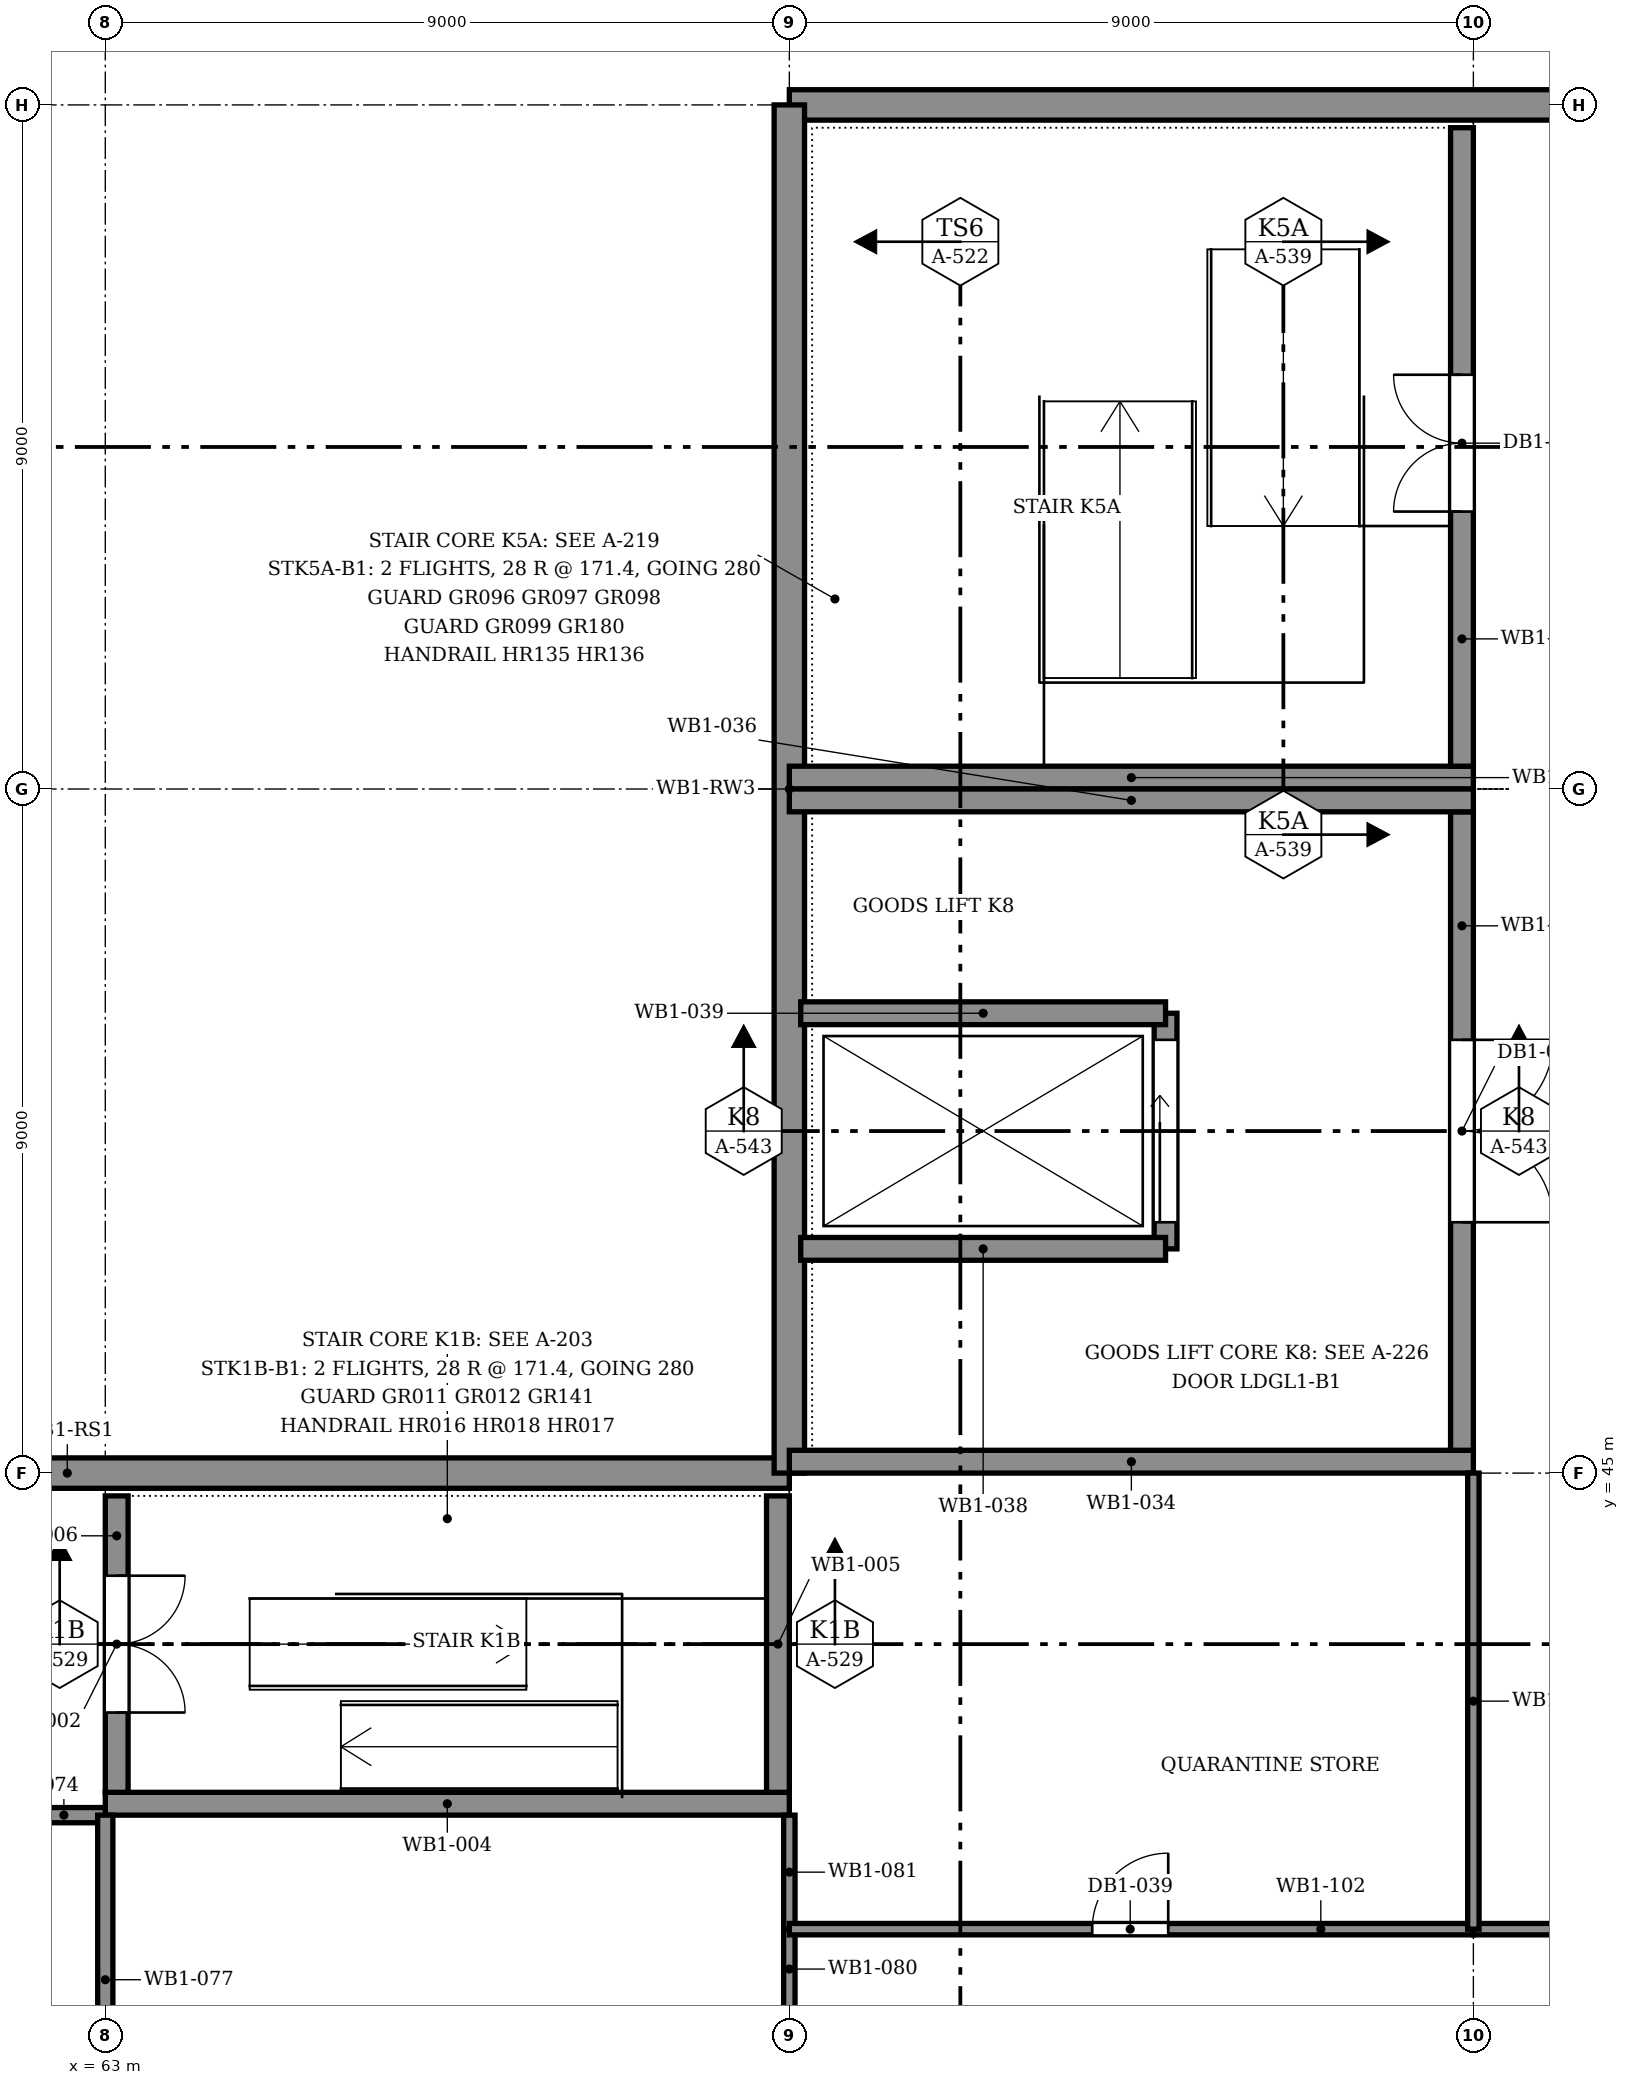
"""IFC4 building model, lengths in metres.
Left out: names, types, materials, properties, quantities, classifications, styles, units other than length and angle.
Written with IfcOpenShell. Run it as: python <this file> out.ifc"""

import sys

from ifc_helpers import new_model, si_unit, direction, frame, frame_2d, origin, place, context, subcontext, project, spatial, rectangle, extrude, element, fill, save


model = new_model("IFC4")
c1 = context("Model", 3, precision=1e-05, world=origin(), true_north=direction((0.0, 1.0)))
c2 = subcontext(c1, "Body", "Model", "MODEL_VIEW")
j1 = project(units=[si_unit("LENGTHUNIT", "METRE"), si_unit("PLANEANGLEUNIT", "RADIAN")], contexts=[c1])
p1 = place(None, origin())
s1 = spatial("IfcSite", under=j1, at=p1, CompositionType="ELEMENT")
p2 = place(p1, origin())
s2 = spatial("IfcBuilding", under=s1, at=p2, CompositionType="ELEMENT")
p3 = place(p2, frame((0.0, 0.0, -4.8)))
s3 = spatial("IfcBuildingStorey", under=s2, at=p3, CompositionType="ELEMENT", Elevation=-4.8)
p4 = place(p3, frame((0.0, 45.0, 0.0), z_axis=(0.0, 0.0, 1.0), x_axis=(1.0, 0.0, 0.0)))
e1 = element("IfcWall", 1, at=p4, inside=s3, PredefinedType="SOLIDWALL", context=c2, shape_type="SweptSolid", body=[
    extrude(rectangle(XDim=72.0, YDim=0.4, at=frame_2d((36.0, 0.0))), origin(), (0.0, 0.0, 1.0), 4.8),
])
p5 = place(p3, frame((72.0, 63.0, 0.0), z_axis=(0.0, 0.0, 1.0), x_axis=(1.0, 0.0, 0.0)))
e2 = element("IfcWall", 2, at=p5, inside=s3, PredefinedType="SOLIDWALL", context=c2, shape_type="SweptSolid", body=[
    extrude(rectangle(XDim=36.0, YDim=0.4, at=frame_2d((18.0, 0.0))), origin(), (0.0, 0.0, 1.0), 4.8),
])
p6 = place(p3, frame((72.0, 45.0, 0.0), z_axis=(0.0, 0.0, 1.0), x_axis=(0.0, 1.0, 0.0)))
e3 = element("IfcWall", 3, at=p6, inside=s3, PredefinedType="SOLIDWALL", context=c2, shape_type="SweptSolid", body=[
    extrude(rectangle(XDim=18.0, YDim=0.4, at=frame_2d((9.0, 0.0))), origin(), (0.0, 0.0, 1.0), 4.8),
])
p7 = place(p3, frame((63.0, 40.65, 0.0), z_axis=(0.0, 0.0, 1.0), x_axis=(1.0, 0.0, 0.0)))
e4 = element("IfcWall", 4, at=p7, inside=s3, PredefinedType="SOLIDWALL", context=c2, shape_type="SweptSolid", body=[
    extrude(rectangle(XDim=9.0, YDim=0.3, at=frame_2d((4.5, 0.0))), origin(), (0.0, 0.0, 1.0), 4.8),
])
p8 = place(p3, frame((71.85, 40.8, 0.0), z_axis=(0.0, 0.0, 1.0), x_axis=(0.0, 1.0, 0.0)))
e5 = element("IfcWall", 5, at=p8, inside=s3, PredefinedType="SOLIDWALL", context=c2, shape_type="SweptSolid", body=[
    extrude(rectangle(XDim=3.9, YDim=0.3, at=frame_2d((1.95, 0.0))), origin(), (0.0, 0.0, 1.0), 4.8),
])
p9 = place(p3, frame((63.15, 40.8, 0.0), z_axis=(0.0, 0.0, 1.0), x_axis=(0.0, 1.0, 0.0)))
e6 = element("IfcWall", 6, at=p9, inside=s3, PredefinedType="SOLIDWALL", context=c2, shape_type="SweptSolid", body=[
    extrude(rectangle(XDim=3.9, YDim=0.3, at=frame_2d((1.95, 0.0))), origin(), (0.0, 0.0, 1.0), 4.8),
])
p10 = place(p9, frame((1.05, 0.0, 0.0)))
e7 = element("IfcOpeningElement", 7, at=p10, cuts=e6, PredefinedType="OPENING", context=c2, shape_type="SweptSolid", body=[
    extrude(rectangle(XDim=1.8, YDim=2.1, at=frame_2d((0.9, 1.05))), frame((0.0, 0.16, 0.0), z_axis=(0.0, -1.0, 0.0), x_axis=(1.0, 0.0, 0.0)), (0.0, 0.0, 1.0), 0.32),
])
p11 = place(p3, frame((72.0, 54.15, 0.0), z_axis=(0.0, 0.0, 1.0), x_axis=(1.0, 0.0, 0.0)))
e8 = element("IfcWall", 8, at=p11, inside=s3, PredefinedType="SOLIDWALL", context=c2, shape_type="SweptSolid", body=[
    extrude(rectangle(XDim=9.0, YDim=0.3, at=frame_2d((4.5, 0.0))), origin(), (0.0, 0.0, 1.0), 4.8),
])
p12 = place(p3, frame((80.85, 54.3, 0.0), z_axis=(0.0, 0.0, 1.0), x_axis=(0.0, 1.0, 0.0)))
e9 = element("IfcWall", 9, at=p12, inside=s3, PredefinedType="SOLIDWALL", context=c2, shape_type="SweptSolid", body=[
    extrude(rectangle(XDim=8.4, YDim=0.3, at=frame_2d((4.2, 0.0))), origin(), (0.0, 0.0, 1.0), 4.8),
])
p13 = place(p12, frame((3.35, 0.0, 0.0)))
e10 = element("IfcOpeningElement", 10, at=p13, cuts=e9, PredefinedType="OPENING", context=c2, shape_type="SweptSolid", body=[
    extrude(rectangle(XDim=1.8, YDim=2.1, at=frame_2d((0.9, 1.05))), frame((0.0, 0.16, 0.0), z_axis=(0.0, -1.0, 0.0), x_axis=(1.0, 0.0, 0.0)), (0.0, 0.0, 1.0), 0.32),
])
p14 = place(p3, frame((72.0, 45.15, 0.0), z_axis=(0.0, 0.0, 1.0), x_axis=(1.0, 0.0, 0.0)))
e11 = element("IfcWall", 11, at=p14, inside=s3, PredefinedType="SOLIDWALL", context=c2, shape_type="SweptSolid", body=[
    extrude(rectangle(XDim=9.0, YDim=0.3, at=frame_2d((4.5, 0.0))), origin(), (0.0, 0.0, 1.0), 4.8),
])
p15 = place(p3, frame((80.85, 45.3, 0.0), z_axis=(0.0, 0.0, 1.0), x_axis=(0.0, 1.0, 0.0)))
e12 = element("IfcWall", 12, at=p15, inside=s3, PredefinedType="SOLIDWALL", context=c2, shape_type="SweptSolid", body=[
    extrude(rectangle(XDim=8.4, YDim=0.3, at=frame_2d((4.2, 0.0))), origin(), (0.0, 0.0, 1.0), 4.8),
])
p16 = place(p15, frame((3.0, 0.0, 0.0)))
e13 = element("IfcOpeningElement", 13, at=p16, cuts=e12, PredefinedType="OPENING", context=c2, shape_type="SweptSolid", body=[
    extrude(rectangle(XDim=2.4, YDim=2.4, at=frame_2d((1.2, 1.2))), frame((0.0, 0.16, 0.0), z_axis=(0.0, -1.0, 0.0), x_axis=(1.0, 0.0, 0.0)), (0.0, 0.0, 1.0), 0.32),
])
p17 = place(p3, frame((72.0, 53.85, 0.0), z_axis=(0.0, 0.0, 1.0), x_axis=(1.0, 0.0, 0.0)))
e14 = element("IfcWall", 14, at=p17, inside=s3, PredefinedType="SOLIDWALL", context=c2, shape_type="SweptSolid", body=[
    extrude(rectangle(XDim=9.0, YDim=0.3, at=frame_2d((4.5, 0.0))), origin(), (0.0, 0.0, 1.0), 4.8),
])
p18 = place(p3, frame((76.95, 47.95, 0.0), z_axis=(0.0, 0.0, 1.0), x_axis=(0.0, 1.0, 0.0)))
e15 = element("IfcWall", 15, at=p18, inside=s3, PredefinedType="SOLIDWALL", context=c2, shape_type="SweptSolid", body=[
    extrude(rectangle(XDim=3.1, YDim=0.3, at=frame_2d((1.55, 0.0))), origin(), (0.0, 0.0, 1.0), 4.8),
])
p19 = place(p18, frame((0.35, 0.0, 0.0)))
e16 = element("IfcOpeningElement", 16, at=p19, cuts=e15, PredefinedType="OPENING", context=c2, shape_type="SweptSolid", body=[
    extrude(rectangle(XDim=2.4, YDim=2.4, at=frame_2d((1.2, 1.2))), frame((0.0, 0.16, 0.0), z_axis=(0.0, -1.0, 0.0), x_axis=(1.0, 0.0, 0.0)), (0.0, 0.0, 1.0), 0.32),
])
for number, where, z_axis, x_axis in (
    (17, (72.15, 47.95, 0.0), (0.0, 0.0, 1.0), (1.0, 0.0, 0.0)),
    (18, (72.15, 51.05, 0.0), (0.0, 0.0, 1.0), (1.0, 0.0, 0.0)),
):
    element("IfcWall", number, at=place(p3, frame(where, z_axis=z_axis, x_axis=x_axis)), inside=s3, PredefinedType="SOLIDWALL", context=c2, shape_type="SweptSolid", body=[
        extrude(rectangle(XDim=4.8, YDim=0.3, at=frame_2d((2.4, 0.0))), origin(), (0.0, 0.0, 1.0), 4.8),
    ])
p20 = place(p3, frame((58.5, 40.5, 0.0), z_axis=(0.0, 0.0, 1.0), x_axis=(1.0, 0.0, 0.0)))
e19 = element("IfcWall", 19, at=p20, inside=s3, PredefinedType="PARTITIONING", context=c2, shape_type="SweptSolid", body=[
    extrude(rectangle(XDim=4.5, YDim=0.2, at=frame_2d((2.25, 0.0))), origin(), (0.0, 0.0, 1.0), 4.023),
])
p21 = place(p20, frame((1.01, 0.0, 0.0)))
e20 = element("IfcOpeningElement", 20, at=p21, cuts=e19, PredefinedType="OPENING", context=c2, shape_type="SweptSolid", body=[
    extrude(rectangle(XDim=2.4, YDim=2.4, at=frame_2d((1.2, 1.2))), frame((0.0, 0.11, 0.0), z_axis=(0.0, -1.0, 0.0), x_axis=(1.0, 0.0, 0.0)), (0.0, 0.0, 1.0), 0.22),
])
p22 = place(p3, frame((63.0, 36.169, 0.0), z_axis=(0.0, 0.0, 1.0), x_axis=(0.0, 1.0, 0.0)))
e21 = element("IfcWall", 21, at=p22, inside=s3, PredefinedType="PARTITIONING", context=c2, shape_type="SweptSolid", body=[
    extrude(rectangle(XDim=4.331, YDim=0.2, at=frame_2d((2.165, 0.0))), origin(), (0.0, 0.0, 1.0), 4.023),
])
p23 = place(p3, frame((72.0, 36.0, 0.0), z_axis=(0.0, 0.0, 1.0), x_axis=(0.0, 1.0, 0.0)))
e22 = element("IfcWall", 22, at=p23, inside=s3, PredefinedType="PARTITIONING", context=c2, shape_type="SweptSolid", body=[
    extrude(rectangle(XDim=3.0, YDim=0.15, at=frame_2d((1.5, 0.0))), origin(), (0.0, 0.0, 1.0), 3.758),
])
p24 = place(p23, frame((0.95, 0.0, 0.0)))
e23 = element("IfcOpeningElement", 23, at=p24, cuts=e22, PredefinedType="OPENING", context=c2, shape_type="SweptSolid", body=[
    extrude(rectangle(XDim=1.0, YDim=2.1, at=frame_2d((0.5, 1.05))), frame((0.0, 0.085, 0.0), z_axis=(0.0, -1.0, 0.0), x_axis=(1.0, 0.0, 0.0)), (0.0, 0.0, 1.0), 0.17),
])
p25 = place(p3, frame((72.0, 39.0, 0.0), z_axis=(0.0, 0.0, 1.0), x_axis=(0.0, 1.0, 0.0)))
e24 = element("IfcWall", 24, at=p25, inside=s3, PredefinedType="PARTITIONING", context=c2, shape_type="SweptSolid", body=[
    extrude(rectangle(XDim=1.5, YDim=0.15, at=frame_2d((0.75, 0.0))), origin(), (0.0, 0.0, 1.0), 3.758),
])
p26 = place(p3, frame((72.0, 39.0, 0.0), z_axis=(0.0, 0.0, 1.0), x_axis=(1.0, 0.0, 0.0)))
e25 = element("IfcWall", 25, at=p26, inside=s3, PredefinedType="PARTITIONING", context=c2, shape_type="SweptSolid", body=[
    extrude(rectangle(XDim=9.0, YDim=0.15, at=frame_2d((4.5, 0.0))), origin(), (0.0, 0.0, 1.0), 3.758),
])
p27 = place(p26, frame((3.985, 0.0, 0.0)))
e26 = element("IfcOpeningElement", 26, at=p27, cuts=e25, PredefinedType="OPENING", context=c2, shape_type="SweptSolid", body=[
    extrude(rectangle(XDim=1.0, YDim=2.1, at=frame_2d((0.5, 1.05))), frame((0.0, 0.085, 0.0), z_axis=(0.0, -1.0, 0.0), x_axis=(1.0, 0.0, 0.0)), (0.0, 0.0, 1.0), 0.17),
])
p28 = place(p3, frame((81.0, 39.0, 0.0), z_axis=(0.0, 0.0, 1.0), x_axis=(1.0, 0.0, 0.0)))
e27 = element("IfcWall", 27, at=p28, inside=s3, PredefinedType="PARTITIONING", context=c2, shape_type="SweptSolid", body=[
    extrude(rectangle(XDim=9.0, YDim=0.15, at=frame_2d((4.5, 0.0))), origin(), (0.0, 0.0, 1.0), 3.758),
])
p29 = place(p28, frame((3.985, 0.0, 0.0)))
e28 = element("IfcOpeningElement", 28, at=p29, cuts=e27, PredefinedType="OPENING", context=c2, shape_type="SweptSolid", body=[
    extrude(rectangle(XDim=1.0, YDim=2.1, at=frame_2d((0.5, 1.05))), frame((0.0, 0.085, 0.0), z_axis=(0.0, -1.0, 0.0), x_axis=(1.0, 0.0, 0.0)), (0.0, 0.0, 1.0), 0.17),
])
p30 = place(p3, frame((81.0, 39.0, 0.0), z_axis=(0.0, 0.0, 1.0), x_axis=(0.0, 1.0, 0.0)))
e29 = element("IfcWall", 29, at=p30, inside=s3, PredefinedType="PARTITIONING", context=c2, shape_type="SweptSolid", body=[
    extrude(rectangle(XDim=6.0, YDim=0.15, at=frame_2d((3.0, 0.0))), origin(), (0.0, 0.0, 1.0), 3.758),
])
p31 = place(p10, frame((1.8, 0.0, 0.0), z_axis=(0.0, 0.0, 1.0), x_axis=(-1.0, 0.0, 0.0)))
e30 = element("IfcDoor", 30, at=p31, inside=s3, OperationType="DOUBLE_DOOR_SINGLE_SWING", PredefinedType="DOOR", context=c2, shape_type="SweptSolid", body=[
    extrude(rectangle(XDim=1.8, YDim=2.1, at=frame_2d((0.9, 1.05))), frame((0.0, 0.025, 0.0), z_axis=(0.0, -1.0, 0.0), x_axis=(1.0, 0.0, 0.0)), (0.0, 0.0, 1.0), 0.05),
])
fill(e7, e30)
p32 = place(p13, origin())
e31 = element("IfcDoor", 31, at=p32, inside=s3, OperationType="DOUBLE_DOOR_SINGLE_SWING", PredefinedType="DOOR", context=c2, shape_type="SweptSolid", body=[
    extrude(rectangle(XDim=1.8, YDim=2.1, at=frame_2d((0.9, 1.05))), frame((0.0, 0.025, 0.0), z_axis=(0.0, -1.0, 0.0), x_axis=(1.0, 0.0, 0.0)), (0.0, 0.0, 1.0), 0.05),
])
fill(e10, e31)
p33 = place(p19, origin())
e32 = element("IfcDoor", 32, at=p33, inside=s3, OperationType="DOUBLE_DOOR_SLIDING", PredefinedType="DOOR", context=c2, shape_type="SweptSolid", body=[
    extrude(rectangle(XDim=2.4, YDim=2.4, at=frame_2d((1.2, 1.2))), frame((0.0, 0.025, 0.0), z_axis=(0.0, -1.0, 0.0), x_axis=(1.0, 0.0, 0.0)), (0.0, 0.0, 1.0), 0.05),
])
fill(e16, e32)
p34 = place(p16, frame((2.4, 0.0, 0.0), z_axis=(0.0, 0.0, 1.0), x_axis=(-1.0, 0.0, 0.0)))
e33 = element("IfcDoor", 33, at=p34, inside=s3, OperationType="DOUBLE_DOOR_SINGLE_SWING", PredefinedType="DOOR", context=c2, shape_type="SweptSolid", body=[
    extrude(rectangle(XDim=2.4, YDim=2.4, at=frame_2d((1.2, 1.2))), frame((0.0, 0.025, 0.0), z_axis=(0.0, -1.0, 0.0), x_axis=(1.0, 0.0, 0.0)), (0.0, 0.0, 1.0), 0.05),
])
fill(e13, e33)
p35 = place(p27, origin())
e34 = element("IfcDoor", 34, at=p35, inside=s3, OperationType="SINGLE_SWING_LEFT", PredefinedType="DOOR", context=c2, shape_type="SweptSolid", body=[
    extrude(rectangle(XDim=1.0, YDim=2.1, at=frame_2d((0.5, 1.05))), frame((0.0, 0.025, 0.0), z_axis=(0.0, -1.0, 0.0), x_axis=(1.0, 0.0, 0.0)), (0.0, 0.0, 1.0), 0.05),
])
fill(e26, e34)
save(model, sys.argv[1])
